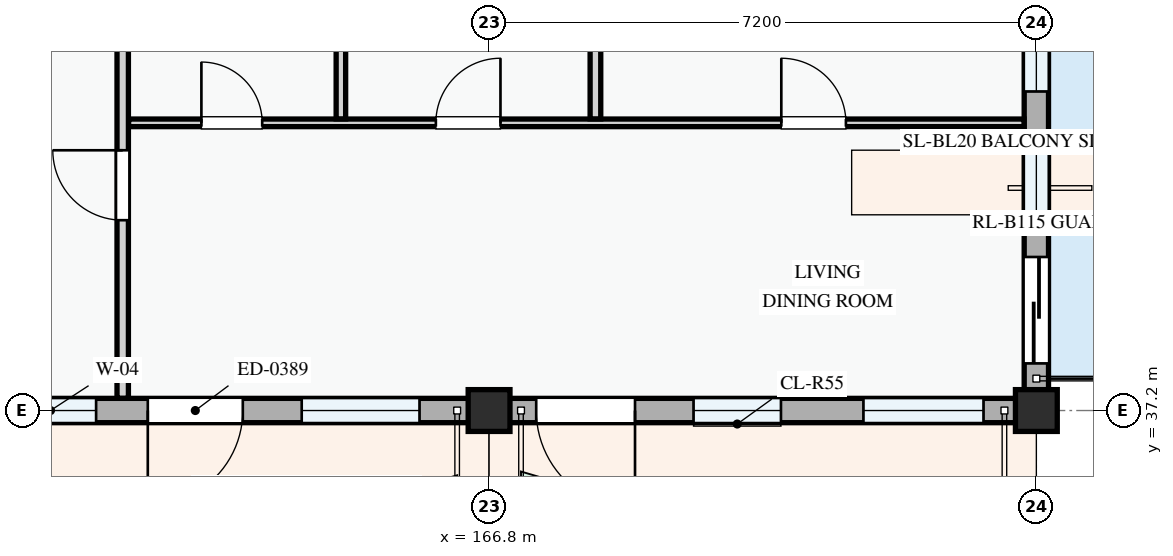
"""IFC4 building model, lengths in metres.
Left out: names, types, materials, properties, quantities, classifications, styles, units other than length and angle.
Written with IfcOpenShell. Run it as: python <this file> out.ifc"""

import sys

from ifc_helpers import new_model, si_unit, direction, frame, frame_2d, origin, origin_2d, place, context, subcontext, project, spatial, rectangle, extrude, element, fill, save


model = new_model("IFC4")
c1 = context("Model", 3, precision=1e-05, world=origin(), true_north=direction((0.0, 1.0)))
c2 = subcontext(c1, "Body", "Model", "MODEL_VIEW")
j1 = project(units=[si_unit("LENGTHUNIT", "METRE"), si_unit("PLANEANGLEUNIT", "RADIAN")], contexts=[c1])
p1 = place(None, origin())
s1 = spatial("IfcSite", under=j1, at=p1, CompositionType="ELEMENT")
p2 = place(p1, origin())
s2 = spatial("IfcBuilding", under=s1, at=p2, CompositionType="ELEMENT")
p3 = place(p2, frame((0.0, 0.0, 11.4)))
s3 = spatial("IfcBuildingStorey", under=s2, at=p3, CompositionType="ELEMENT", Elevation=11.4)
for number, where, z_axis, x_axis in (
    (1, (166.8, 37.2, 0.0), (0.0, 0.0, 1.0), (1.0, 0.0, 0.0)),
    (2, (174.0, 37.2, 0.0), (0.0, 0.0, 1.0), (1.0, 0.0, 0.0)),
):
    element("IfcColumn", number, at=place(p3, frame(where, z_axis=z_axis, x_axis=x_axis)), inside=s3, PredefinedType="COLUMN", context=c2, shape_type="SweptSolid", body=[
        extrude(rectangle(XDim=0.55, YDim=0.55, at=origin_2d()), origin(), (0.0, 0.0, 1.0), 3.3),
    ])
p4 = place(p3, frame((158.4, 37.2, 0.0), z_axis=(0.0, 0.0, 1.0), x_axis=(1.0, 0.0, 0.0)))
e3 = element("IfcWall", 3, at=p4, inside=s3, PredefinedType="STANDARD", context=c2, shape_type="SweptSolid", body=[
    extrude(rectangle(XDim=8.4, YDim=0.32, at=frame_2d((4.2, 0.0))), origin(), (0.0, 0.0, 1.0), 2.375),
])
p5 = place(p4, frame((3.91, 0.0, 0.0)))
e4 = element("IfcOpeningElement", 4, at=p5, cuts=e3, PredefinedType="OPENING", context=c2, shape_type="SweptSolid", body=[
    extrude(rectangle(XDim=1.25, YDim=2.2, at=frame_2d((0.625, 1.1))), frame((0.0, 0.17, 0.0), z_axis=(0.0, -1.0, 0.0), x_axis=(1.0, 0.0, 0.0)), (0.0, 0.0, 1.0), 0.34),
])
p6 = place(p4, frame((0.485, 0.0, 0.78)))
e5 = element("IfcOpeningElement", 5, at=p6, cuts=e3, PredefinedType="OPENING", context=c2, shape_type="SweptSolid", body=[
    extrude(rectangle(XDim=0.9, YDim=1.2, at=frame_2d((0.45, 0.6))), frame((0.0, 0.17, 0.0), z_axis=(0.0, -1.0, 0.0), x_axis=(1.0, 0.0, 0.0)), (0.0, 0.0, 1.0), 0.34),
])
p7 = place(p4, frame((2.03, 0.0, 0.78)))
e6 = element("IfcOpeningElement", 6, at=p7, cuts=e3, PredefinedType="OPENING", context=c2, shape_type="SweptSolid", body=[
    extrude(rectangle(XDim=1.2, YDim=1.35, at=frame_2d((0.6, 0.675))), frame((0.0, 0.17, 0.0), z_axis=(0.0, -1.0, 0.0), x_axis=(1.0, 0.0, 0.0)), (0.0, 0.0, 1.0), 0.34),
])
p8 = place(p4, frame((5.935, 0.0, 0.78)))
e7 = element("IfcOpeningElement", 7, at=p8, cuts=e3, PredefinedType="OPENING", context=c2, shape_type="SweptSolid", body=[
    extrude(rectangle(XDim=1.55, YDim=1.4, at=frame_2d((0.775, 0.7))), frame((0.0, 0.17, 0.0), z_axis=(0.0, -1.0, 0.0), x_axis=(1.0, 0.0, 0.0)), (0.0, 0.0, 1.0), 0.34),
])
p9 = place(p3, frame((166.8, 37.2, 0.0), z_axis=(0.0, 0.0, 1.0), x_axis=(1.0, 0.0, 0.0)))
e8 = element("IfcWall", 8, at=p9, inside=s3, PredefinedType="STANDARD", context=c2, shape_type="SweptSolid", body=[
    extrude(rectangle(XDim=7.2, YDim=0.32, at=frame_2d((3.6, 0.0))), origin(), (0.0, 0.0, 1.0), 2.375),
])
p10 = place(p9, frame((0.62, 0.0, 0.0)))
e9 = element("IfcOpeningElement", 9, at=p10, cuts=e8, PredefinedType="OPENING", context=c2, shape_type="SweptSolid", body=[
    extrude(rectangle(XDim=1.3, YDim=2.15, at=frame_2d((0.65, 1.075))), frame((0.0, 0.17, 0.0), z_axis=(0.0, -1.0, 0.0), x_axis=(1.0, 0.0, 0.0)), (0.0, 0.0, 1.0), 0.34),
])
p11 = place(p9, frame((2.69, 0.0, 0.78)))
e10 = element("IfcOpeningElement", 10, at=p11, cuts=e8, PredefinedType="OPENING", context=c2, shape_type="SweptSolid", body=[
    extrude(rectangle(XDim=1.15, YDim=1.25, at=frame_2d((0.575, 0.625))), frame((0.0, 0.17, 0.0), z_axis=(0.0, -1.0, 0.0), x_axis=(1.0, 0.0, 0.0)), (0.0, 0.0, 1.0), 0.34),
])
p12 = place(p9, frame((4.925, 0.0, 0.78)))
e11 = element("IfcOpeningElement", 11, at=p12, cuts=e8, PredefinedType="OPENING", context=c2, shape_type="SweptSolid", body=[
    extrude(rectangle(XDim=1.58, YDim=1.48, at=frame_2d((0.79, 0.74))), frame((0.0, 0.17, 0.0), z_axis=(0.0, -1.0, 0.0), x_axis=(1.0, 0.0, 0.0)), (0.0, 0.0, 1.0), 0.34),
])
p13 = place(p3, frame((174.0, 37.2, 0.0), z_axis=(0.0, 0.0, 1.0), x_axis=(0.0, 1.0, 0.0)))
e12 = element("IfcWall", 12, at=p13, inside=s3, PredefinedType="STANDARD", context=c2, shape_type="SweptSolid", body=[
    extrude(rectangle(XDim=6.0, YDim=0.32, at=frame_2d((3.0, 0.0))), origin(), (0.0, 0.0, 1.0), 2.575),
])
p14 = place(p13, frame((0.62, 0.0, 0.0)))
e13 = element("IfcOpeningElement", 13, at=p14, cuts=e12, PredefinedType="OPENING", context=c2, shape_type="SweptSolid", body=[
    extrude(rectangle(XDim=1.4, YDim=2.2, at=frame_2d((0.7, 1.1))), frame((0.0, 0.17, 0.0), z_axis=(0.0, -1.0, 0.0), x_axis=(1.0, 0.0, 0.0)), (0.0, 0.0, 1.0), 0.34),
])
p15 = place(p13, frame((2.377, 0.0, 0.78)))
e14 = element("IfcOpeningElement", 14, at=p15, cuts=e12, PredefinedType="OPENING", context=c2, shape_type="SweptSolid", body=[
    extrude(rectangle(XDim=1.1, YDim=1.3, at=frame_2d((0.55, 0.65))), frame((0.0, 0.17, 0.0), z_axis=(0.0, -1.0, 0.0), x_axis=(1.0, 0.0, 0.0)), (0.0, 0.0, 1.0), 0.34),
])
p16 = place(p13, frame((4.198, 0.0, 0.78)))
e15 = element("IfcOpeningElement", 15, at=p16, cuts=e12, PredefinedType="OPENING", context=c2, shape_type="SweptSolid", body=[
    extrude(rectangle(XDim=1.2, YDim=1.35, at=frame_2d((0.6, 0.675))), frame((0.0, 0.17, 0.0), z_axis=(0.0, -1.0, 0.0), x_axis=(1.0, 0.0, 0.0)), (0.0, 0.0, 1.0), 0.34),
])
p17 = place(p3, frame((162.057, 40.985, 0.0), z_axis=(0.0, 0.0, 1.0), x_axis=(1.0, 0.0, 0.0)))
e16 = element("IfcWall", 16, at=p17, inside=s3, PredefinedType="PARTITIONING", context=c2, shape_type="SweptSolid", body=[
    extrude(rectangle(XDim=11.781, YDim=0.1, at=frame_2d((5.891, 0.0))), origin(), (0.0, 0.0, 1.0), 3.0),
])
p18 = place(p17, frame((0.958, 0.0, 0.0)))
e17 = element("IfcOpeningElement", 17, at=p18, cuts=e16, PredefinedType="OPENING", context=c2, shape_type="SweptSolid", body=[
    extrude(rectangle(XDim=0.8, YDim=2.1, at=frame_2d((0.4, 1.05))), frame((0.0, 0.06, 0.0), z_axis=(0.0, -1.0, 0.0), x_axis=(1.0, 0.0, 0.0)), (0.0, 0.0, 1.0), 0.12),
])
p19 = place(p17, frame((4.043, 0.0, 0.0)))
e18 = element("IfcOpeningElement", 18, at=p19, cuts=e16, PredefinedType="OPENING", context=c2, shape_type="SweptSolid", body=[
    extrude(rectangle(XDim=0.85, YDim=2.1, at=frame_2d((0.425, 1.05))), frame((0.0, 0.06, 0.0), z_axis=(0.0, -1.0, 0.0), x_axis=(1.0, 0.0, 0.0)), (0.0, 0.0, 1.0), 0.12),
])
p20 = place(p17, frame((8.588, 0.0, 0.0)))
e19 = element("IfcOpeningElement", 19, at=p20, cuts=e16, PredefinedType="OPENING", context=c2, shape_type="SweptSolid", body=[
    extrude(rectangle(XDim=0.85, YDim=2.1, at=frame_2d((0.425, 1.05))), frame((0.0, 0.06, 0.0), z_axis=(0.0, -1.0, 0.0), x_axis=(1.0, 0.0, 0.0)), (0.0, 0.0, 1.0), 0.12),
])
p21 = place(p3, frame((168.199, 41.037, 0.0), z_axis=(0.0, 0.0, 1.0), x_axis=(0.0, 1.0, 0.0)))
e20 = element("IfcWall", 20, at=p21, inside=s3, PredefinedType="PARTITIONING", context=c2, shape_type="SweptSolid", body=[
    extrude(rectangle(XDim=3.871, YDim=0.14, at=frame_2d((1.936, 0.0))), origin(), (0.0, 0.0, 1.0), 3.0),
])
p22 = place(p3, frame((164.85, 41.037, 0.0), z_axis=(0.0, 0.0, 1.0), x_axis=(0.0, 1.0, 0.0)))
e21 = element("IfcWall", 21, at=p22, inside=s3, PredefinedType="PARTITIONING", context=c2, shape_type="SweptSolid", body=[
    extrude(rectangle(XDim=3.871, YDim=0.125, at=frame_2d((1.936, 0.0))), origin(), (0.0, 0.0, 1.0), 3.0),
])
p23 = place(p3, frame((161.98, 37.362, 0.0), z_axis=(0.0, 0.0, 1.0), x_axis=(0.0, 1.0, 0.0)))
e22 = element("IfcWall", 22, at=p23, inside=s3, PredefinedType="PARTITIONING", context=c2, shape_type="SweptSolid", body=[
    extrude(rectangle(XDim=20.378, YDim=0.15, at=frame_2d((10.189, 0.0))), origin(), (0.0, 0.0, 1.0), 3.0),
])
p24 = place(p23, frame((2.342, 0.0, 0.0)))
e23 = element("IfcOpeningElement", 23, at=p24, cuts=e22, PredefinedType="OPENING", context=c2, shape_type="SweptSolid", body=[
    extrude(rectangle(XDim=0.92, YDim=2.1, at=frame_2d((0.46, 1.05))), frame((0.0, 0.085, 0.0), z_axis=(0.0, -1.0, 0.0), x_axis=(1.0, 0.0, 0.0)), (0.0, 0.0, 1.0), 0.17),
])
p25 = place(p23, frame((9.581, 0.0, 0.0)))
e24 = element("IfcOpeningElement", 24, at=p25, cuts=e22, PredefinedType="OPENING", context=c2, shape_type="SweptSolid", body=[
    extrude(rectangle(XDim=0.96, YDim=2.12, at=frame_2d((0.48, 1.06))), frame((0.0, 0.085, 0.0), z_axis=(0.0, -1.0, 0.0), x_axis=(1.0, 0.0, 0.0)), (0.0, 0.0, 1.0), 0.17),
])
p26 = place(p5, frame((1.25, 0.0, 0.0), z_axis=(0.0, 0.0, 1.0), x_axis=(-1.0, 0.0, 0.0)))
e25 = element("IfcDoor", 25, at=p26, inside=s3, OperationType="SINGLE_SWING_RIGHT", PredefinedType="DOOR", context=c2, shape_type="SweptSolid", body=[
    extrude(rectangle(XDim=1.25, YDim=2.2, at=frame_2d((0.625, 1.1))), frame((0.0, 0.025, 0.0), z_axis=(0.0, -1.0, 0.0), x_axis=(1.0, 0.0, 0.0)), (0.0, 0.0, 1.0), 0.05),
])
fill(e4, e25)
p27 = place(p7, origin())
e26 = element("IfcWindow", 26, at=p27, inside=s3, PartitioningType="SINGLE_PANEL", PredefinedType="WINDOW", context=c2, shape_type="SweptSolid", body=[
    extrude(rectangle(XDim=1.2, YDim=1.35, at=frame_2d((0.6, 0.675))), frame((0.0, 0.03, 0.0), z_axis=(0.0, -1.0, 0.0), x_axis=(1.0, 0.0, 0.0)), (0.0, 0.0, 1.0), 0.06),
])
fill(e6, e26)
p28 = place(p8, origin())
e27 = element("IfcWindow", 27, at=p28, inside=s3, PartitioningType="SINGLE_PANEL", PredefinedType="WINDOW", context=c2, shape_type="SweptSolid", body=[
    extrude(rectangle(XDim=1.55, YDim=1.4, at=frame_2d((0.775, 0.7))), frame((0.0, 0.03, 0.0), z_axis=(0.0, -1.0, 0.0), x_axis=(1.0, 0.0, 0.0)), (0.0, 0.0, 1.0), 0.06),
])
fill(e7, e27)
p29 = place(p10, frame((1.3, 0.0, 0.0), z_axis=(0.0, 0.0, 1.0), x_axis=(-1.0, 0.0, 0.0)))
e28 = element("IfcDoor", 28, at=p29, inside=s3, OperationType="SINGLE_SWING_LEFT", PredefinedType="DOOR", context=c2, shape_type="SweptSolid", body=[
    extrude(rectangle(XDim=1.3, YDim=2.15, at=frame_2d((0.65, 1.075))), frame((0.0, 0.025, 0.0), z_axis=(0.0, -1.0, 0.0), x_axis=(1.0, 0.0, 0.0)), (0.0, 0.0, 1.0), 0.05),
])
fill(e9, e28)
p30 = place(p11, origin())
e29 = element("IfcWindow", 29, at=p30, inside=s3, PartitioningType="SINGLE_PANEL", PredefinedType="WINDOW", context=c2, shape_type="SweptSolid", body=[
    extrude(rectangle(XDim=1.15, YDim=1.25, at=frame_2d((0.575, 0.625))), frame((0.0, 0.03, 0.0), z_axis=(0.0, -1.0, 0.0), x_axis=(1.0, 0.0, 0.0)), (0.0, 0.0, 1.0), 0.06),
])
fill(e10, e29)
p31 = place(p12, origin())
e30 = element("IfcWindow", 30, at=p31, inside=s3, PartitioningType="SINGLE_PANEL", PredefinedType="WINDOW", context=c2, shape_type="SweptSolid", body=[
    extrude(rectangle(XDim=1.58, YDim=1.48, at=frame_2d((0.79, 0.74))), frame((0.0, 0.03, 0.0), z_axis=(0.0, -1.0, 0.0), x_axis=(1.0, 0.0, 0.0)), (0.0, 0.0, 1.0), 0.06),
])
fill(e11, e30)
p32 = place(p14, frame((1.4, 0.0, 0.0), z_axis=(0.0, 0.0, 1.0), x_axis=(-1.0, 0.0, 0.0)))
e31 = element("IfcDoor", 31, at=p32, inside=s3, OperationType="SLIDING_TO_LEFT", PredefinedType="DOOR", context=c2, shape_type="SweptSolid", body=[
    extrude(rectangle(XDim=1.4, YDim=2.2, at=frame_2d((0.7, 1.1))), frame((0.0, 0.025, 0.0), z_axis=(0.0, -1.0, 0.0), x_axis=(1.0, 0.0, 0.0)), (0.0, 0.0, 1.0), 0.05),
])
fill(e13, e31)
p33 = place(p15, origin())
e32 = element("IfcWindow", 32, at=p33, inside=s3, PartitioningType="SINGLE_PANEL", PredefinedType="WINDOW", context=c2, shape_type="SweptSolid", body=[
    extrude(rectangle(XDim=1.1, YDim=1.3, at=frame_2d((0.55, 0.65))), frame((0.0, 0.03, 0.0), z_axis=(0.0, -1.0, 0.0), x_axis=(1.0, 0.0, 0.0)), (0.0, 0.0, 1.0), 0.06),
])
fill(e14, e32)
p34 = place(p16, origin())
e33 = element("IfcWindow", 33, at=p34, inside=s3, PartitioningType="SINGLE_PANEL", PredefinedType="WINDOW", context=c2, shape_type="SweptSolid", body=[
    extrude(rectangle(XDim=1.2, YDim=1.35, at=frame_2d((0.6, 0.675))), frame((0.0, 0.03, 0.0), z_axis=(0.0, -1.0, 0.0), x_axis=(1.0, 0.0, 0.0)), (0.0, 0.0, 1.0), 0.06),
])
fill(e15, e33)
p35 = place(p18, origin())
e34 = element("IfcDoor", 34, at=p35, inside=s3, OperationType="SINGLE_SWING_LEFT", PredefinedType="DOOR", context=c2, shape_type="SweptSolid", body=[
    extrude(rectangle(XDim=0.8, YDim=2.1, at=frame_2d((0.4, 1.05))), frame((0.0, 0.025, 0.0), z_axis=(0.0, -1.0, 0.0), x_axis=(1.0, 0.0, 0.0)), (0.0, 0.0, 1.0), 0.05),
])
fill(e17, e34)
p36 = place(p19, origin())
e35 = element("IfcDoor", 35, at=p36, inside=s3, OperationType="SINGLE_SWING_RIGHT", PredefinedType="DOOR", context=c2, shape_type="SweptSolid", body=[
    extrude(rectangle(XDim=0.85, YDim=2.1, at=frame_2d((0.425, 1.05))), frame((0.0, 0.025, 0.0), z_axis=(0.0, -1.0, 0.0), x_axis=(1.0, 0.0, 0.0)), (0.0, 0.0, 1.0), 0.05),
])
fill(e18, e35)
p37 = place(p20, origin())
e36 = element("IfcDoor", 36, at=p37, inside=s3, OperationType="SINGLE_SWING_LEFT", PredefinedType="DOOR", context=c2, shape_type="SweptSolid", body=[
    extrude(rectangle(XDim=0.85, YDim=2.1, at=frame_2d((0.425, 1.05))), frame((0.0, 0.025, 0.0), z_axis=(0.0, -1.0, 0.0), x_axis=(1.0, 0.0, 0.0)), (0.0, 0.0, 1.0), 0.05),
])
fill(e19, e36)
p38 = place(p24, origin())
e37 = element("IfcDoor", 37, at=p38, inside=s3, OperationType="SINGLE_SWING_RIGHT", PredefinedType="DOOR", context=c2, shape_type="SweptSolid", body=[
    extrude(rectangle(XDim=0.92, YDim=2.1, at=frame_2d((0.46, 1.05))), frame((0.0, 0.025, 0.0), z_axis=(0.0, -1.0, 0.0), x_axis=(1.0, 0.0, 0.0)), (0.0, 0.0, 1.0), 0.05),
])
fill(e23, e37)
save(model, sys.argv[1])
